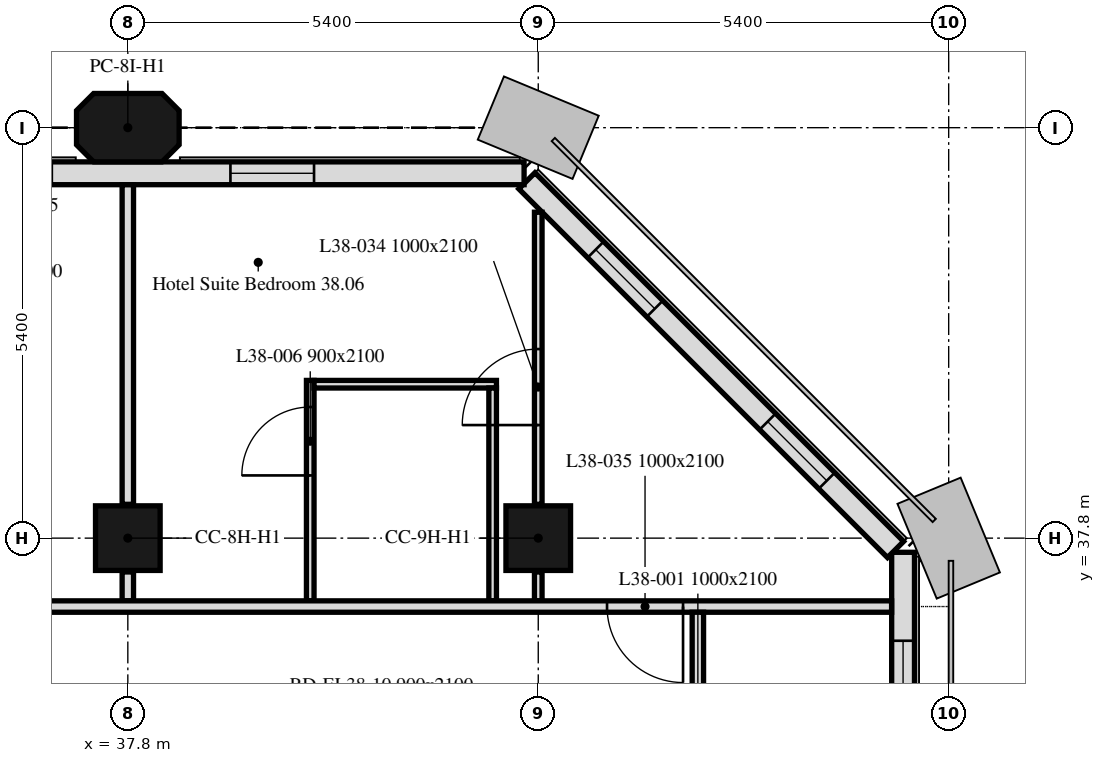
"""IFC4 building model, lengths in metres.
Left out: names, types, materials, properties, quantities, classifications, styles, units other than length and angle.
Written with IfcOpenShell. Run it as: python <this file> out.ifc"""

import sys

from ifc_helpers import new_model, si_unit, direction, frame, frame_2d, origin, origin_2d, place, context, subcontext, project, spatial, polyline, rectangle, outline, extrude, element, fill, save


model = new_model("IFC4")
c1 = context("Model", 3, precision=1e-05, world=origin(), true_north=direction((0.0, 1.0)))
c2 = subcontext(c1, "Body", "Model", "MODEL_VIEW")
j1 = project(units=[si_unit("LENGTHUNIT", "METRE"), si_unit("PLANEANGLEUNIT", "RADIAN")], contexts=[c1])
p1 = place(None, origin())
s1 = spatial("IfcSite", under=j1, at=p1, CompositionType="ELEMENT")
p2 = place(p1, origin())
s2 = spatial("IfcBuilding", under=s1, at=p2, CompositionType="ELEMENT")
p3 = place(p2, frame((0.0, 0.0, 162.7)))
s3 = spatial("IfcBuildingStorey", under=s2, at=p3, CompositionType="ELEMENT", Elevation=162.7)
for number, where, z_axis, x_axis in (
    (1, (37.8, 37.8, 0.0), (0.0, 0.0, 1.0), (1.0, 0.0, 0.0)),
    (2, (43.2, 37.8, 0.0), (0.0, 0.0, 1.0), (1.0, 0.0, 0.0)),
):
    element("IfcColumn", number, at=place(p3, frame(where, z_axis=z_axis, x_axis=x_axis)), inside=s3, PredefinedType="COLUMN", context=c2, shape_type="SweptSolid", body=[
        extrude(rectangle(XDim=0.85, YDim=0.85, at=origin_2d()), origin(), (0.0, 0.0, 1.0), 3.0),
    ])
p4 = place(p3, frame((37.8, 43.2, 0.0), z_axis=(0.0, 0.0, 1.0), x_axis=(1.0, 0.0, 0.0)))
e3 = element("IfcColumn", 3, at=p4, inside=s3, PredefinedType="COLUMN", context=c2, shape_type="SweptSolid", body=[
    extrude(outline(polyline([(-0.45, -0.45), (0.45, -0.45), (0.675, -0.225), (0.675, 0.225), (0.45, 0.45), (-0.45, 0.45), (-0.675, 0.225), (-0.675, -0.225), (-0.45, -0.45)])), origin(), (0.0, 0.0, 1.0), 3.0),
])
p5 = place(p3, frame((48.0, 5.586, 0.0), z_axis=(0.0, 0.0, 1.0), x_axis=(0.0, 1.0, 0.0)))
e4 = element("IfcWall", 4, at=p5, inside=s3, PredefinedType="SOLIDWALL", context=c2, shape_type="SweptSolid", body=[
    extrude(rectangle(XDim=32.027, YDim=0.3, at=frame_2d((16.014, 0.0))), origin(), (0.0, 0.0, 1.0), 3.0),
])
p6 = place(p5, frame((1.164, 0.0, 0.9)))
e5 = element("IfcOpeningElement", 5, at=p6, cuts=e4, PredefinedType="OPENING", context=c2, shape_type="SweptSolid", body=[
    extrude(rectangle(XDim=1.1, YDim=1.7, at=frame_2d((0.55, 0.85))), frame((0.0, 0.16, 0.0), z_axis=(0.0, -1.0, 0.0), x_axis=(1.0, 0.0, 0.0)), (0.0, 0.0, 1.0), 0.32),
])
p7 = place(p5, frame((2.589, 0.0, 0.9)))
e6 = element("IfcOpeningElement", 6, at=p7, cuts=e4, PredefinedType="OPENING", context=c2, shape_type="SweptSolid", body=[
    extrude(rectangle(XDim=0.65, YDim=1.7, at=frame_2d((0.325, 0.85))), frame((0.0, 0.16, 0.0), z_axis=(0.0, -1.0, 0.0), x_axis=(1.0, 0.0, 0.0)), (0.0, 0.0, 1.0), 0.32),
])
p8 = place(p5, frame((6.214, 0.0, 0.9)))
e7 = element("IfcOpeningElement", 7, at=p8, cuts=e4, PredefinedType="OPENING", context=c2, shape_type="SweptSolid", body=[
    extrude(rectangle(XDim=3.4, YDim=1.7, at=frame_2d((1.7, 0.85))), frame((0.0, 0.16, 0.0), z_axis=(0.0, -1.0, 0.0), x_axis=(1.0, 0.0, 0.0)), (0.0, 0.0, 1.0), 0.32),
])
p9 = place(p5, frame((11.964, 0.0, 0.9)))
e8 = element("IfcOpeningElement", 8, at=p9, cuts=e4, PredefinedType="OPENING", context=c2, shape_type="SweptSolid", body=[
    extrude(rectangle(XDim=1.1, YDim=1.7, at=frame_2d((0.55, 0.85))), frame((0.0, 0.16, 0.0), z_axis=(0.0, -1.0, 0.0), x_axis=(1.0, 0.0, 0.0)), (0.0, 0.0, 1.0), 0.32),
])
p10 = place(p5, frame((13.564, 0.0, 0.9)))
e9 = element("IfcOpeningElement", 9, at=p10, cuts=e4, PredefinedType="OPENING", context=c2, shape_type="SweptSolid", body=[
    extrude(rectangle(XDim=1.1, YDim=1.7, at=frame_2d((0.55, 0.85))), frame((0.0, 0.16, 0.0), z_axis=(0.0, -1.0, 0.0), x_axis=(1.0, 0.0, 0.0)), (0.0, 0.0, 1.0), 0.32),
])
p11 = place(p5, frame((17.364, 0.0, 0.9)))
e10 = element("IfcOpeningElement", 10, at=p11, cuts=e4, PredefinedType="OPENING", context=c2, shape_type="SweptSolid", body=[
    extrude(rectangle(XDim=1.1, YDim=1.7, at=frame_2d((0.55, 0.85))), frame((0.0, 0.16, 0.0), z_axis=(0.0, -1.0, 0.0), x_axis=(1.0, 0.0, 0.0)), (0.0, 0.0, 1.0), 0.32),
])
p12 = place(p5, frame((18.964, 0.0, 0.9)))
e11 = element("IfcOpeningElement", 11, at=p12, cuts=e4, PredefinedType="OPENING", context=c2, shape_type="SweptSolid", body=[
    extrude(rectangle(XDim=1.1, YDim=1.7, at=frame_2d((0.55, 0.85))), frame((0.0, 0.16, 0.0), z_axis=(0.0, -1.0, 0.0), x_axis=(1.0, 0.0, 0.0)), (0.0, 0.0, 1.0), 0.32),
])
p13 = place(p5, frame((22.764, 0.0, 0.9)))
e12 = element("IfcOpeningElement", 12, at=p13, cuts=e4, PredefinedType="OPENING", context=c2, shape_type="SweptSolid", body=[
    extrude(rectangle(XDim=1.1, YDim=1.7, at=frame_2d((0.55, 0.85))), frame((0.0, 0.16, 0.0), z_axis=(0.0, -1.0, 0.0), x_axis=(1.0, 0.0, 0.0)), (0.0, 0.0, 1.0), 0.32),
])
p14 = place(p5, frame((24.364, 0.0, 0.9)))
e13 = element("IfcOpeningElement", 13, at=p14, cuts=e4, PredefinedType="OPENING", context=c2, shape_type="SweptSolid", body=[
    extrude(rectangle(XDim=1.1, YDim=1.7, at=frame_2d((0.55, 0.85))), frame((0.0, 0.16, 0.0), z_axis=(0.0, -1.0, 0.0), x_axis=(1.0, 0.0, 0.0)), (0.0, 0.0, 1.0), 0.32),
])
p15 = place(p5, frame((28.164, 0.0, 0.9)))
e14 = element("IfcOpeningElement", 14, at=p15, cuts=e4, PredefinedType="OPENING", context=c2, shape_type="SweptSolid", body=[
    extrude(rectangle(XDim=1.1, YDim=1.7, at=frame_2d((0.55, 0.85))), frame((0.0, 0.16, 0.0), z_axis=(0.0, -1.0, 0.0), x_axis=(1.0, 0.0, 0.0)), (0.0, 0.0, 1.0), 0.32),
])
p16 = place(p5, frame((29.764, 0.0, 0.9)))
e15 = element("IfcOpeningElement", 15, at=p16, cuts=e4, PredefinedType="OPENING", context=c2, shape_type="SweptSolid", body=[
    extrude(rectangle(XDim=1.1, YDim=1.7, at=frame_2d((0.55, 0.85))), frame((0.0, 0.16, 0.0), z_axis=(0.0, -1.0, 0.0), x_axis=(1.0, 0.0, 0.0)), (0.0, 0.0, 1.0), 0.32),
])
p17 = place(p3, frame((47.901, 37.65, 0.0), z_axis=(0.0, 0.0, 1.0), x_axis=(-0.707106781187, 0.707106781187, 0.0)))
e16 = element("IfcWall", 16, at=p17, inside=s3, PredefinedType="SOLIDWALL", context=c2, shape_type="SweptSolid", body=[
    extrude(rectangle(XDim=6.86, YDim=0.3, at=frame_2d((3.43, 0.0))), origin(), (0.0, 0.0, 1.0), 3.0),
])
p18 = place(p17, frame((1.28, 0.0, 0.9)))
e17 = element("IfcOpeningElement", 17, at=p18, cuts=e16, PredefinedType="OPENING", context=c2, shape_type="SweptSolid", body=[
    extrude(rectangle(XDim=1.1, YDim=1.7, at=frame_2d((0.55, 0.85))), frame((0.0, 0.16, 0.0), z_axis=(0.0, -1.0, 0.0), x_axis=(1.0, 0.0, 0.0)), (0.0, 0.0, 1.0), 0.32),
])
p19 = place(p17, frame((4.48, 0.0, 0.9)))
e18 = element("IfcOpeningElement", 18, at=p19, cuts=e16, PredefinedType="OPENING", context=c2, shape_type="SweptSolid", body=[
    extrude(rectangle(XDim=1.1, YDim=1.7, at=frame_2d((0.55, 0.85))), frame((0.0, 0.16, 0.0), z_axis=(0.0, -1.0, 0.0), x_axis=(1.0, 0.0, 0.0)), (0.0, 0.0, 1.0), 0.32),
])
p20 = place(p3, frame((43.014, 42.6, 0.0), z_axis=(0.0, 0.0, 1.0), x_axis=(-1.0, 0.0, 0.0)))
e19 = element("IfcWall", 19, at=p20, inside=s3, PredefinedType="SOLIDWALL", context=c2, shape_type="SweptSolid", body=[
    extrude(rectangle(XDim=32.027, YDim=0.3, at=frame_2d((16.014, 0.0))), origin(), (0.0, 0.0, 1.0), 3.0),
])
p21 = place(p20, frame((2.764, 0.0, 0.9)))
e20 = element("IfcOpeningElement", 20, at=p21, cuts=e19, PredefinedType="OPENING", context=c2, shape_type="SweptSolid", body=[
    extrude(rectangle(XDim=1.1, YDim=1.7, at=frame_2d((0.55, 0.85))), frame((0.0, 0.16, 0.0), z_axis=(0.0, -1.0, 0.0), x_axis=(1.0, 0.0, 0.0)), (0.0, 0.0, 1.0), 0.32),
])
p22 = place(p20, frame((6.214, 0.0, 0.9)))
e21 = element("IfcOpeningElement", 21, at=p22, cuts=e19, PredefinedType="OPENING", context=c2, shape_type="SweptSolid", body=[
    extrude(rectangle(XDim=3.4, YDim=1.7, at=frame_2d((1.7, 0.85))), frame((0.0, 0.16, 0.0), z_axis=(0.0, -1.0, 0.0), x_axis=(1.0, 0.0, 0.0)), (0.0, 0.0, 1.0), 0.32),
])
p23 = place(p20, frame((13.564, 0.0, 0.9)))
e22 = element("IfcOpeningElement", 22, at=p23, cuts=e19, PredefinedType="OPENING", context=c2, shape_type="SweptSolid", body=[
    extrude(rectangle(XDim=1.1, YDim=1.7, at=frame_2d((0.55, 0.85))), frame((0.0, 0.16, 0.0), z_axis=(0.0, -1.0, 0.0), x_axis=(1.0, 0.0, 0.0)), (0.0, 0.0, 1.0), 0.32),
])
p24 = place(p20, frame((17.014, 0.0, 0.9)))
e23 = element("IfcOpeningElement", 23, at=p24, cuts=e19, PredefinedType="OPENING", context=c2, shape_type="SweptSolid", body=[
    extrude(rectangle(XDim=3.4, YDim=1.7, at=frame_2d((1.7, 0.85))), frame((0.0, 0.16, 0.0), z_axis=(0.0, -1.0, 0.0), x_axis=(1.0, 0.0, 0.0)), (0.0, 0.0, 1.0), 0.32),
])
p25 = place(p20, frame((24.364, 0.0, 0.9)))
e24 = element("IfcOpeningElement", 24, at=p25, cuts=e19, PredefinedType="OPENING", context=c2, shape_type="SweptSolid", body=[
    extrude(rectangle(XDim=1.1, YDim=1.7, at=frame_2d((0.55, 0.85))), frame((0.0, 0.16, 0.0), z_axis=(0.0, -1.0, 0.0), x_axis=(1.0, 0.0, 0.0)), (0.0, 0.0, 1.0), 0.32),
])
p26 = place(p20, frame((27.814, 0.0, 0.9)))
e25 = element("IfcOpeningElement", 25, at=p26, cuts=e19, PredefinedType="OPENING", context=c2, shape_type="SweptSolid", body=[
    extrude(rectangle(XDim=3.4, YDim=1.7, at=frame_2d((1.7, 0.85))), frame((0.0, 0.16, 0.0), z_axis=(0.0, -1.0, 0.0), x_axis=(1.0, 0.0, 0.0)), (0.0, 0.0, 1.0), 0.32),
])
p27 = place(p3, frame((37.8, 36.975, 0.0), z_axis=(0.0, 0.0, 1.0), x_axis=(0.0, 1.0, 0.0)))
e26 = element("IfcWall", 26, at=p27, inside=s3, PredefinedType="PARTITIONING", context=c2, shape_type="SweptSolid", body=[
    extrude(rectangle(XDim=0.38, YDim=0.15, at=frame_2d((0.19, 0.0))), origin(), (0.0, 0.0, 1.0), 3.0),
])
p28 = place(p3, frame((37.8, 38.245, 0.0), z_axis=(0.0, 0.0, 1.0), x_axis=(0.0, 1.0, 0.0)))
e27 = element("IfcWall", 27, at=p28, inside=s3, PredefinedType="PARTITIONING", context=c2, shape_type="SweptSolid", body=[
    extrude(rectangle(XDim=4.204, YDim=0.15, at=frame_2d((2.102, 0.0))), origin(), (0.0, 0.0, 1.0), 3.0),
])
p29 = place(p3, frame((40.2, 36.975, 0.0), z_axis=(0.0, 0.0, 1.0), x_axis=(0.0, 1.0, 0.0)))
e28 = element("IfcWall", 28, at=p29, inside=s3, PredefinedType="PARTITIONING", context=c2, shape_type="SweptSolid", body=[
    extrude(rectangle(XDim=2.9, YDim=0.1, at=frame_2d((1.45, 0.0))), origin(), (0.0, 0.0, 1.0), 3.0),
])
p30 = place(p29, frame((1.65, 0.0, 0.0)))
e29 = element("IfcOpeningElement", 29, at=p30, cuts=e28, PredefinedType="OPENING", context=c2, shape_type="SweptSolid", body=[
    extrude(rectangle(XDim=0.9, YDim=2.1, at=frame_2d((0.45, 1.05))), frame((0.0, 0.05, 0.0), z_axis=(0.0, -1.0, 0.0), x_axis=(1.0, 0.0, 0.0)), (0.0, 0.0, 1.0), 0.1),
])
p31 = place(p3, frame((40.25, 39.825, 0.0), z_axis=(0.0, 0.0, 1.0), x_axis=(1.0, 0.0, 0.0)))
e30 = element("IfcWall", 30, at=p31, inside=s3, PredefinedType="PARTITIONING", context=c2, shape_type="SweptSolid", body=[
    extrude(rectangle(XDim=2.4, YDim=0.1, at=frame_2d((1.2, 0.0))), origin(), (0.0, 0.0, 1.0), 3.0),
])
p32 = place(p3, frame((42.6, 39.775, 0.0), z_axis=(0.0, 0.0, 1.0), x_axis=(0.0, -1.0, 0.0)))
e31 = element("IfcWall", 31, at=p32, inside=s3, PredefinedType="PARTITIONING", context=c2, shape_type="SweptSolid", body=[
    extrude(rectangle(XDim=2.8, YDim=0.1, at=frame_2d((1.4, 0.0))), origin(), (0.0, 0.0, 1.0), 3.0),
])
p33 = place(p3, frame((43.2, 36.975, 0.0), z_axis=(0.0, 0.0, 1.0), x_axis=(0.0, 1.0, 0.0)))
e32 = element("IfcWall", 32, at=p33, inside=s3, PredefinedType="PARTITIONING", context=c2, shape_type="SweptSolid", body=[
    extrude(rectangle(XDim=0.38, YDim=0.1, at=frame_2d((0.19, 0.0))), origin(), (0.0, 0.0, 1.0), 3.0),
])
p34 = place(p3, frame((43.2, 38.245, 0.0), z_axis=(0.0, 0.0, 1.0), x_axis=(0.0, 1.0, 0.0)))
e33 = element("IfcWall", 33, at=p34, inside=s3, PredefinedType="PARTITIONING", context=c2, shape_type="SweptSolid", body=[
    extrude(rectangle(XDim=3.843, YDim=0.1, at=frame_2d((1.921, 0.0))), origin(), (0.0, 0.0, 1.0), 3.0),
])
p35 = place(p34, frame((1.042, 0.0, 0.0)))
e34 = element("IfcOpeningElement", 34, at=p35, cuts=e33, PredefinedType="OPENING", context=c2, shape_type="SweptSolid", body=[
    extrude(rectangle(XDim=1.0, YDim=2.1, at=frame_2d((0.5, 1.05))), frame((0.0, 0.05, 0.0), z_axis=(0.0, -1.0, 0.0), x_axis=(1.0, 0.0, 0.0)), (0.0, 0.0, 1.0), 0.1),
])
p36 = place(p3, frame((47.849, 36.9, 0.0), z_axis=(0.0, 0.0, 1.0), x_axis=(-1.0, 0.0, 0.0)))
e35 = element("IfcWall", 35, at=p36, inside=s3, PredefinedType="PARTITIONING", context=c2, shape_type="SweptSolid", body=[
    extrude(rectangle(XDim=41.698, YDim=0.15, at=frame_2d((20.849, 0.0))), origin(), (0.0, 0.0, 1.0), 3.0),
])
p37 = place(p36, frame((39.249, 0.0, 0.0)))
e36 = element("IfcOpeningElement", 36, at=p37, cuts=e35, PredefinedType="OPENING", context=c2, shape_type="SweptSolid", body=[
    extrude(rectangle(XDim=1.0, YDim=2.1, at=frame_2d((0.5, 1.05))), frame((0.0, 0.075, 0.0), z_axis=(0.0, -1.0, 0.0), x_axis=(1.0, 0.0, 0.0)), (0.0, 0.0, 1.0), 0.15),
])
p38 = place(p36, frame((28.449, 0.0, 0.0)))
e37 = element("IfcOpeningElement", 37, at=p38, cuts=e35, PredefinedType="OPENING", context=c2, shape_type="SweptSolid", body=[
    extrude(rectangle(XDim=1.0, YDim=2.1, at=frame_2d((0.5, 1.05))), frame((0.0, 0.075, 0.0), z_axis=(0.0, -1.0, 0.0), x_axis=(1.0, 0.0, 0.0)), (0.0, 0.0, 1.0), 0.15),
])
p39 = place(p36, frame((16.849, 0.0, 0.0)))
e38 = element("IfcOpeningElement", 38, at=p39, cuts=e35, PredefinedType="OPENING", context=c2, shape_type="SweptSolid", body=[
    extrude(rectangle(XDim=1.0, YDim=2.1, at=frame_2d((0.5, 1.05))), frame((0.0, 0.075, 0.0), z_axis=(0.0, -1.0, 0.0), x_axis=(1.0, 0.0, 0.0)), (0.0, 0.0, 1.0), 0.15),
])
p40 = place(p36, frame((11.449, 0.0, 0.0)))
e39 = element("IfcOpeningElement", 39, at=p40, cuts=e35, PredefinedType="OPENING", context=c2, shape_type="SweptSolid", body=[
    extrude(rectangle(XDim=1.0, YDim=2.1, at=frame_2d((0.5, 1.05))), frame((0.0, 0.075, 0.0), z_axis=(0.0, -1.0, 0.0), x_axis=(1.0, 0.0, 0.0)), (0.0, 0.0, 1.0), 0.15),
])
p41 = place(p36, frame((2.744, 0.0, 0.0)))
e40 = element("IfcOpeningElement", 40, at=p41, cuts=e35, PredefinedType="OPENING", context=c2, shape_type="SweptSolid", body=[
    extrude(rectangle(XDim=1.0, YDim=2.1, at=frame_2d((0.5, 1.05))), frame((0.0, 0.075, 0.0), z_axis=(0.0, -1.0, 0.0), x_axis=(1.0, 0.0, 0.0)), (0.0, 0.0, 1.0), 0.15),
])
p42 = place(p3, frame((45.3, 36.825, 0.0), z_axis=(0.0, 0.0, 1.0), x_axis=(0.0, -1.0, 0.0)))
e41 = element("IfcWall", 41, at=p42, inside=s3, PredefinedType="PARTITIONING", context=c2, shape_type="SweptSolid", body=[
    extrude(rectangle(XDim=15.15, YDim=0.15, at=frame_2d((7.575, 0.0))), origin(), (0.0, 0.0, 1.0), 2.4),
])
p43 = place(p42, frame((1.675, 0.0, 0.0)))
e42 = element("IfcOpeningElement", 42, at=p43, cuts=e41, PredefinedType="OPENING", context=c2, shape_type="SweptSolid", body=[
    extrude(rectangle(XDim=1.0, YDim=2.1, at=frame_2d((0.5, 1.05))), frame((0.0, 0.075, 0.0), z_axis=(0.0, -1.0, 0.0), x_axis=(1.0, 0.0, 0.0)), (0.0, 0.0, 1.0), 0.15),
])
p44 = place(p42, frame((7.975, 0.0, 0.0)))
e43 = element("IfcOpeningElement", 43, at=p44, cuts=e41, PredefinedType="OPENING", context=c2, shape_type="SweptSolid", body=[
    extrude(rectangle(XDim=1.0, YDim=2.1, at=frame_2d((0.5, 1.05))), frame((0.0, 0.075, 0.0), z_axis=(0.0, -1.0, 0.0), x_axis=(1.0, 0.0, 0.0)), (0.0, 0.0, 1.0), 0.15),
])
p45 = place(p16, origin())
e44 = element("IfcWindow", 44, at=p45, inside=s3, PartitioningType="SINGLE_PANEL", PredefinedType="WINDOW", context=c2, shape_type="SweptSolid", body=[
    extrude(rectangle(XDim=1.1, YDim=1.7, at=frame_2d((0.55, 0.85))), frame((0.0, 0.03, 0.0), z_axis=(0.0, -1.0, 0.0), x_axis=(1.0, 0.0, 0.0)), (0.0, 0.0, 1.0), 0.06),
])
fill(e15, e44)
p46 = place(p18, origin())
e45 = element("IfcWindow", 45, at=p46, inside=s3, PartitioningType="SINGLE_PANEL", PredefinedType="WINDOW", context=c2, shape_type="SweptSolid", body=[
    extrude(rectangle(XDim=1.1, YDim=1.7, at=frame_2d((0.55, 0.85))), frame((0.0, 0.03, 0.0), z_axis=(0.0, -1.0, 0.0), x_axis=(1.0, 0.0, 0.0)), (0.0, 0.0, 1.0), 0.06),
])
fill(e17, e45)
p47 = place(p19, origin())
e46 = element("IfcWindow", 46, at=p47, inside=s3, PartitioningType="SINGLE_PANEL", PredefinedType="WINDOW", context=c2, shape_type="SweptSolid", body=[
    extrude(rectangle(XDim=1.1, YDim=1.7, at=frame_2d((0.55, 0.85))), frame((0.0, 0.03, 0.0), z_axis=(0.0, -1.0, 0.0), x_axis=(1.0, 0.0, 0.0)), (0.0, 0.0, 1.0), 0.06),
])
fill(e18, e46)
p48 = place(p21, origin())
e47 = element("IfcWindow", 47, at=p48, inside=s3, PartitioningType="SINGLE_PANEL", PredefinedType="WINDOW", context=c2, shape_type="SweptSolid", body=[
    extrude(rectangle(XDim=1.1, YDim=1.7, at=frame_2d((0.55, 0.85))), frame((0.0, 0.03, 0.0), z_axis=(0.0, -1.0, 0.0), x_axis=(1.0, 0.0, 0.0)), (0.0, 0.0, 1.0), 0.06),
])
fill(e20, e47)
p49 = place(p30, origin())
e48 = element("IfcDoor", 48, at=p49, inside=s3, OperationType="SINGLE_SWING_LEFT", PredefinedType="DOOR", context=c2, shape_type="SweptSolid", body=[
    extrude(rectangle(XDim=0.9, YDim=2.1, at=frame_2d((0.45, 1.05))), frame((0.0, 0.025, 0.0), z_axis=(0.0, -1.0, 0.0), x_axis=(1.0, 0.0, 0.0)), (0.0, 0.0, 1.0), 0.05),
])
fill(e29, e48)
p50 = place(p35, origin())
e49 = element("IfcDoor", 49, at=p50, inside=s3, OperationType="SINGLE_SWING_LEFT", PredefinedType="DOOR", context=c2, shape_type="SweptSolid", body=[
    extrude(rectangle(XDim=1.0, YDim=2.1, at=frame_2d((0.5, 1.05))), frame((0.0, 0.025, 0.0), z_axis=(0.0, -1.0, 0.0), x_axis=(1.0, 0.0, 0.0)), (0.0, 0.0, 1.0), 0.05),
])
fill(e34, e49)
p51 = place(p41, origin())
e50 = element("IfcDoor", 50, at=p51, inside=s3, OperationType="SINGLE_SWING_RIGHT", PredefinedType="DOOR", context=c2, shape_type="SweptSolid", body=[
    extrude(rectangle(XDim=1.0, YDim=2.1, at=frame_2d((0.5, 1.05))), frame((0.0, 0.025, 0.0), z_axis=(0.0, -1.0, 0.0), x_axis=(1.0, 0.0, 0.0)), (0.0, 0.0, 1.0), 0.05),
])
fill(e40, e50)
save(model, sys.argv[1])
